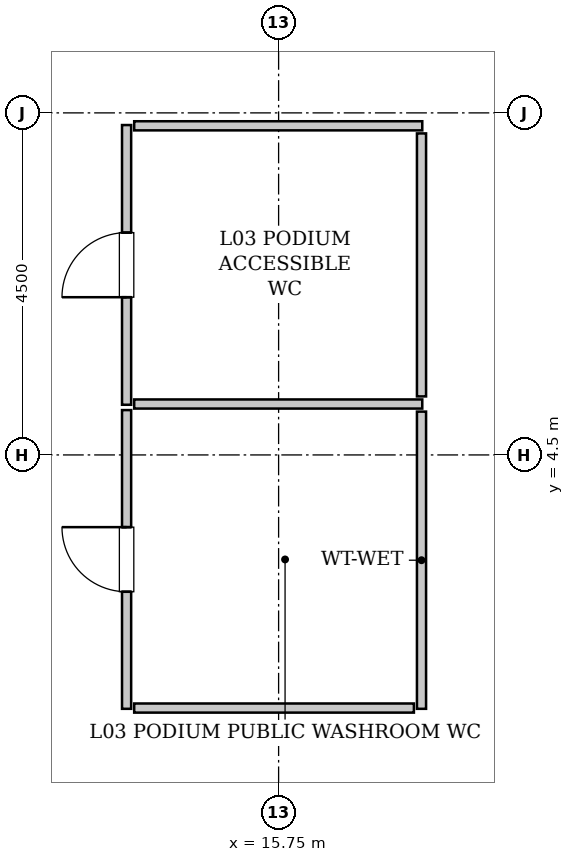
"""IFC4 building model, lengths in metres.
Left out: names, types, materials, properties, quantities, classifications, styles, units other than length and angle.
Written with IfcOpenShell. Run it as: python <this file> out.ifc"""

import sys

from ifc_helpers import new_model, si_unit, direction, frame, frame_2d, origin, place, context, subcontext, project, spatial, rectangle, extrude, source, transform, mapped, element, fill, save


model = new_model("IFC4")
c1 = context("Model", 3, precision=1e-05, world=origin(), true_north=direction((0.0, 1.0)))
c2 = subcontext(c1, "Body", "Model", "MODEL_VIEW")
j1 = project(units=[si_unit("LENGTHUNIT", "METRE"), si_unit("PLANEANGLEUNIT", "RADIAN")], contexts=[c1])
p1 = place(None, origin())
s1 = spatial("IfcSite", under=j1, at=p1, CompositionType="ELEMENT")
p2 = place(p1, origin())
s2 = spatial("IfcBuilding", under=s1, at=p2, CompositionType="ELEMENT")
p3 = place(p2, frame((0.0, 0.0, 16.8)))
s3 = spatial("IfcBuildingStorey", under=s2, at=p3, CompositionType="ELEMENT", Elevation=16.8)
m1 = source(origin(), c2, "Body", "SweptSolid", [
    extrude(rectangle(XDim=3.68, YDim=0.12, at=frame_2d((1.84, 0.0))), origin(), (0.0, 0.0, 1.0), 5.085),
])
p4 = place(p3, frame((13.75, 5.16, 0.0), z_axis=(0.0, 0.0, 1.0), x_axis=(0.0, 1.0, 0.0)))
e1 = element("IfcWall", 1, at=p4, inside=s3, PredefinedType="PLUMBINGWALL", context=c2, shape_type="MappedRepresentation", body=[
    mapped(m1, transform((0.0, 0.0, 0.0), x_axis=(1.0, 0.0, 0.0), y_axis=(0.0, 1.0, 0.0), z_axis=(0.0, 0.0, 1.0), scale=1.0)),
])
p5 = place(p4, frame((1.415, 0.0, 0.0)))
e2 = element("IfcOpeningElement", 2, at=p5, cuts=e1, PredefinedType="OPENING", context=c2, shape_type="SweptSolid", body=[
    extrude(rectangle(XDim=0.85, YDim=2.1, at=frame_2d((0.425, 1.05))), frame((0.0, 0.07, 0.0), z_axis=(0.0, -1.0, 0.0), x_axis=(1.0, 0.0, 0.0)), (0.0, 0.0, 1.0), 0.14),
])
m2 = source(origin(), c2, "Body", "SweptSolid", [
    extrude(rectangle(XDim=3.79, YDim=0.12, at=frame_2d((1.895, 0.0))), origin(), (0.0, 0.0, 1.0), 5.085),
])
p6 = place(p3, frame((13.85, 5.17, 0.0), z_axis=(0.0, 0.0, 1.0), x_axis=(1.0, 0.0, 0.0)))
e3 = element("IfcWall", 3, at=p6, inside=s3, PredefinedType="PLUMBINGWALL", context=c2, shape_type="MappedRepresentation", body=[
    mapped(m2, transform((0.0, 0.0, 0.0), x_axis=(1.0, 0.0, 0.0), y_axis=(0.0, 1.0, 0.0), z_axis=(0.0, 0.0, 1.0), scale=1.0)),
])
m3 = source(origin(), c2, "Body", "SweptSolid", [
    extrude(rectangle(XDim=3.79, YDim=0.12, at=frame_2d((1.895, 0.0))), origin(), (0.0, 0.0, 1.0), 4.075),
])
p7 = place(p3, frame((13.85, 8.83, 0.0), z_axis=(0.0, 0.0, 1.0), x_axis=(1.0, 0.0, 0.0)))
e4 = element("IfcWall", 4, at=p7, inside=s3, PredefinedType="PLUMBINGWALL", context=c2, shape_type="MappedRepresentation", body=[
    mapped(m3, transform((0.0, 0.0, 0.0), x_axis=(1.0, 0.0, 0.0), y_axis=(0.0, 1.0, 0.0), z_axis=(0.0, 0.0, 1.0), scale=1.0)),
])
m4 = source(origin(), c2, "Body", "SweptSolid", [
    extrude(rectangle(XDim=3.46, YDim=0.12, at=frame_2d((1.73, 0.0))), origin(), (0.0, 0.0, 1.0), 4.625),
])
p8 = place(p3, frame((17.63, 5.27, 0.0), z_axis=(0.0, 0.0, 1.0), x_axis=(0.0, 1.0, 0.0)))
e5 = element("IfcWall", 5, at=p8, inside=s3, PredefinedType="PLUMBINGWALL", context=c2, shape_type="MappedRepresentation", body=[
    mapped(m4, transform((0.0, 0.0, 0.0), x_axis=(1.0, 0.0, 0.0), y_axis=(0.0, 1.0, 0.0), z_axis=(0.0, 0.0, 1.0), scale=1.0)),
])
m5 = source(origin(), c2, "Body", "SweptSolid", [
    extrude(rectangle(XDim=3.93, YDim=0.12, at=frame_2d((1.965, 0.0))), origin(), (0.0, 0.0, 1.0), 5.085),
])
p9 = place(p3, frame((13.75, 1.16, 0.0), z_axis=(0.0, 0.0, 1.0), x_axis=(0.0, 1.0, 0.0)))
e6 = element("IfcWall", 6, at=p9, inside=s3, PredefinedType="PLUMBINGWALL", context=c2, shape_type="MappedRepresentation", body=[
    mapped(m5, transform((0.0, 0.0, 0.0), x_axis=(1.0, 0.0, 0.0), y_axis=(0.0, 1.0, 0.0), z_axis=(0.0, 0.0, 1.0), scale=1.0)),
])
p10 = place(p9, frame((1.54, 0.0, 0.0)))
e7 = element("IfcOpeningElement", 7, at=p10, cuts=e6, PredefinedType="OPENING", context=c2, shape_type="SweptSolid", body=[
    extrude(rectangle(XDim=0.85, YDim=2.1, at=frame_2d((0.425, 1.05))), frame((0.0, 0.07, 0.0), z_axis=(0.0, -1.0, 0.0), x_axis=(1.0, 0.0, 0.0)), (0.0, 0.0, 1.0), 0.14),
])
m6 = source(origin(), c2, "Body", "SweptSolid", [
    extrude(rectangle(XDim=3.91, YDim=0.12, at=frame_2d((1.955, 0.0))), origin(), (0.0, 0.0, 1.0), 4.625),
])
p11 = place(p3, frame((17.63, 1.16, 0.0), z_axis=(0.0, 0.0, 1.0), x_axis=(0.0, 1.0, 0.0)))
e8 = element("IfcWall", 8, at=p11, inside=s3, PredefinedType="PLUMBINGWALL", context=c2, shape_type="MappedRepresentation", body=[
    mapped(m6, transform((0.0, 0.0, 0.0), x_axis=(1.0, 0.0, 0.0), y_axis=(0.0, 1.0, 0.0), z_axis=(0.0, 0.0, 1.0), scale=1.0)),
])
m7 = source(origin(), c2, "Body", "SweptSolid", [
    extrude(rectangle(XDim=3.68, YDim=0.12, at=frame_2d((1.84, 0.0))), origin(), (0.0, 0.0, 1.0), 5.085),
])
p12 = place(p3, frame((13.85, 1.17, 0.0), z_axis=(0.0, 0.0, 1.0), x_axis=(1.0, 0.0, 0.0)))
e9 = element("IfcWall", 9, at=p12, inside=s3, PredefinedType="PLUMBINGWALL", context=c2, shape_type="MappedRepresentation", body=[
    mapped(m7, transform((0.0, 0.0, 0.0), x_axis=(1.0, 0.0, 0.0), y_axis=(0.0, 1.0, 0.0), z_axis=(0.0, 0.0, 1.0), scale=1.0)),
])
m8 = source(origin(), c2, "Body", "SweptSolid", [
    extrude(rectangle(XDim=0.85, YDim=2.1, at=frame_2d((0.425, 1.05))), frame((0.0, 0.025, 0.0), z_axis=(0.0, -1.0, 0.0), x_axis=(1.0, 0.0, 0.0)), (0.0, 0.0, 1.0), 0.05),
])
p13 = place(p5, origin())
e10 = element("IfcDoor", 10, at=p13, inside=s3, OperationType="SINGLE_SWING_LEFT", PredefinedType="DOOR", context=c2, shape_type="MappedRepresentation", body=[
    mapped(m8, transform((0.0, 0.0, 0.0), x_axis=(1.0, 0.0, 0.0), y_axis=(0.0, 1.0, 0.0), z_axis=(0.0, 0.0, 1.0), scale=1.0)),
])
fill(e2, e10)
p14 = place(p10, origin())
e11 = element("IfcDoor", 11, at=p14, inside=s3, OperationType="SINGLE_SWING_RIGHT", PredefinedType="DOOR", context=c2, shape_type="MappedRepresentation", body=[
    mapped(m8, transform((0.0, 0.0, 0.0), x_axis=(1.0, 0.0, 0.0), y_axis=(0.0, 1.0, 0.0), z_axis=(0.0, 0.0, 1.0), scale=1.0)),
])
fill(e7, e11)
save(model, sys.argv[1])
